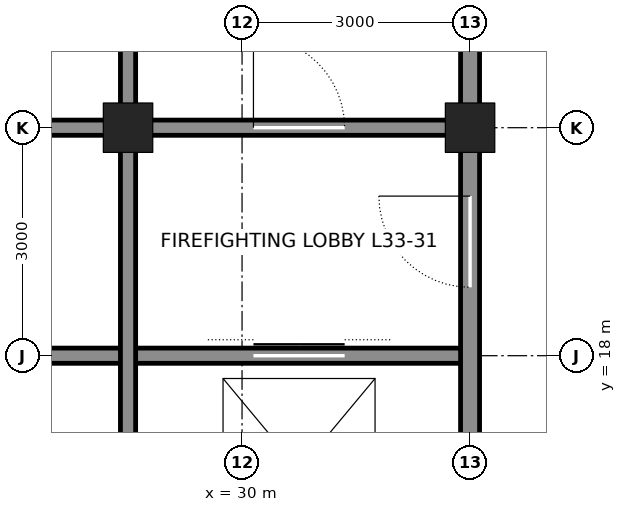
"""IFC4 building model, lengths in metres.
Left out: names, types, materials, properties, quantities, classifications, styles, units other than length and angle.
Written with IfcOpenShell. Run it as: python <this file> out.ifc"""

import sys

from ifc_helpers import new_model, si_unit, direction, frame, frame_2d, origin, origin_2d, place, context, subcontext, project, spatial, rectangle, hollow_rectangle, extrude, element, fill, save


model = new_model("IFC4")
c1 = context("Model", 3, precision=1e-05, world=origin(), true_north=direction((0.0, 1.0)))
c2 = subcontext(c1, "Body", "Model", "MODEL_VIEW")
j1 = project(units=[si_unit("LENGTHUNIT", "METRE"), si_unit("PLANEANGLEUNIT", "RADIAN")], contexts=[c1])
p1 = place(None, origin())
s1 = spatial("IfcSite", under=j1, at=p1, CompositionType="ELEMENT")
p2 = place(p1, origin())
s2 = spatial("IfcBuilding", under=s1, at=p2, CompositionType="ELEMENT")
p3 = place(p2, frame((0.0, 0.0, 153.0)))
s3 = spatial("IfcBuildingStorey", under=s2, at=p3, CompositionType="ELEMENT", Elevation=153.0)
for number, where, z_axis, x_axis in (
    (1, (33.0, 21.0, 0.0), (0.0, 0.0, 1.0), (1.0, 0.0, 0.0)),
    (2, (28.5, 21.0, 0.0), (0.0, 0.0, 1.0), (1.0, 0.0, 0.0)),
):
    element("IfcColumn", number, at=place(p3, frame(where, z_axis=z_axis, x_axis=x_axis)), inside=s3, PredefinedType="COLUMN", context=c2, shape_type="SweptSolid", body=[
        extrude(hollow_rectangle(XDim=0.65, YDim=0.65, WallThickness=0.065, at=origin_2d()), origin(), (0.0, 0.0, 1.0), 4.2),
    ])
p4 = place(p3, frame((25.5, 18.0, 0.0), z_axis=(0.0, 0.0, 1.0), x_axis=(1.0, 0.0, 0.0)))
e3 = element("IfcWall", 3, at=p4, inside=s3, PredefinedType="SOLIDWALL", context=c2, shape_type="SweptSolid", body=[
    extrude(rectangle(XDim=7.5, YDim=0.2, at=frame_2d((3.75, 0.0))), origin(), (0.0, 0.0, 1.0), 4.04),
])
p5 = place(p4, frame((4.65, 0.0, 0.0)))
e4 = element("IfcOpeningElement", 4, at=p5, cuts=e3, PredefinedType="OPENING", context=c2, shape_type="SweptSolid", body=[
    extrude(rectangle(XDim=1.2, YDim=2.1, at=frame_2d((0.6, 1.05))), frame((0.0, 0.11, 0.0), z_axis=(0.0, -1.0, 0.0), x_axis=(1.0, 0.0, 0.0)), (0.0, 0.0, 1.0), 0.22),
])
p6 = place(p3, frame((25.5, 21.0, 0.0), z_axis=(0.0, 0.0, 1.0), x_axis=(1.0, 0.0, 0.0)))
e5 = element("IfcWall", 5, at=p6, inside=s3, PredefinedType="SOLIDWALL", context=c2, shape_type="SweptSolid", body=[
    extrude(rectangle(XDim=2.75, YDim=0.2, at=frame_2d((1.375, 0.0))), origin(), (0.0, 0.0, 1.0), 3.09),
])
p7 = place(p3, frame((28.75, 21.0, 0.0), z_axis=(0.0, 0.0, 1.0), x_axis=(1.0, 0.0, 0.0)))
e6 = element("IfcWall", 6, at=p7, inside=s3, PredefinedType="SOLIDWALL", context=c2, shape_type="SweptSolid", body=[
    extrude(rectangle(XDim=4.0, YDim=0.2, at=frame_2d((2.0, 0.0))), origin(), (0.0, 0.0, 1.0), 3.09),
])
p8 = place(p7, frame((1.4, 0.0, 0.0)))
e7 = element("IfcOpeningElement", 7, at=p8, cuts=e6, PredefinedType="OPENING", context=c2, shape_type="SweptSolid", body=[
    extrude(rectangle(XDim=1.2, YDim=2.1, at=frame_2d((0.6, 1.05))), frame((0.0, 0.11, 0.0), z_axis=(0.0, -1.0, 0.0), x_axis=(1.0, 0.0, 0.0)), (0.0, 0.0, 1.0), 0.22),
])
p9 = place(p3, frame((28.5, 12.25, 0.0), z_axis=(0.0, 0.0, 1.0), x_axis=(0.0, 1.0, 0.0)))
e8 = element("IfcWall", 8, at=p9, inside=s3, PredefinedType="SOLIDWALL", context=c2, shape_type="SweptSolid", body=[
    extrude(rectangle(XDim=8.5, YDim=0.2, at=frame_2d((4.25, 0.0))), origin(), (0.0, 0.0, 1.0), 3.113),
])
p10 = place(p3, frame((28.5, 21.25, 0.0), z_axis=(0.0, 0.0, 1.0), x_axis=(0.0, 1.0, 0.0)))
e9 = element("IfcWall", 9, at=p10, inside=s3, PredefinedType="SOLIDWALL", context=c2, shape_type="SweptSolid", body=[
    extrude(rectangle(XDim=2.5, YDim=0.2, at=frame_2d((1.25, 0.0))), origin(), (0.0, 0.0, 1.0), 3.113),
])
p11 = place(p3, frame((33.0, 12.25, 0.0), z_axis=(0.0, 0.0, 1.0), x_axis=(0.0, 1.0, 0.0)))
e10 = element("IfcWall", 10, at=p11, inside=s3, PredefinedType="SOLIDWALL", context=c2, shape_type="SweptSolid", body=[
    extrude(rectangle(XDim=8.5, YDim=0.25, at=frame_2d((4.25, 0.0))), origin(), (0.0, 0.0, 1.0), 3.113),
])
p12 = place(p11, frame((6.65, 0.0, 0.0)))
e11 = element("IfcOpeningElement", 11, at=p12, cuts=e10, PredefinedType="OPENING", context=c2, shape_type="SweptSolid", body=[
    extrude(rectangle(XDim=1.2, YDim=2.1, at=frame_2d((0.6, 1.05))), frame((0.0, 0.135, 0.0), z_axis=(0.0, -1.0, 0.0), x_axis=(1.0, 0.0, 0.0)), (0.0, 0.0, 1.0), 0.27),
])
p13 = place(p11, frame((0.875, 0.0, 0.0)))
e12 = element("IfcOpeningElement", 12, at=p13, cuts=e10, PredefinedType="OPENING", context=c2, shape_type="SweptSolid", body=[
    extrude(rectangle(XDim=0.75, YDim=2.1, at=frame_2d((0.375, 1.05))), frame((0.0, 0.135, 0.0), z_axis=(0.0, -1.0, 0.0), x_axis=(1.0, 0.0, 0.0)), (0.0, 0.0, 1.0), 0.27),
])
p14 = place(p3, frame((33.0, 21.25, 0.0), z_axis=(0.0, 0.0, 1.0), x_axis=(0.0, 1.0, 0.0)))
e13 = element("IfcWall", 13, at=p14, inside=s3, PredefinedType="SOLIDWALL", context=c2, shape_type="SweptSolid", body=[
    extrude(rectangle(XDim=2.5, YDim=0.25, at=frame_2d((1.25, 0.0))), origin(), (0.0, 0.0, 1.0), 3.113),
])
p15 = place(p8, origin())
e14 = element("IfcDoor", 14, at=p15, inside=s3, OperationType="SINGLE_SWING_LEFT", PredefinedType="DOOR", context=c2, shape_type="SweptSolid", body=[
    extrude(rectangle(XDim=1.2, YDim=2.1, at=frame_2d((0.6, 1.05))), frame((0.0, 0.025, 0.0), z_axis=(0.0, -1.0, 0.0), x_axis=(1.0, 0.0, 0.0)), (0.0, 0.0, 1.0), 0.05),
])
fill(e7, e14)
p16 = place(p12, origin())
e15 = element("IfcDoor", 15, at=p16, inside=s3, OperationType="SINGLE_SWING_RIGHT", PredefinedType="DOOR", context=c2, shape_type="SweptSolid", body=[
    extrude(rectangle(XDim=1.2, YDim=2.1, at=frame_2d((0.6, 1.05))), frame((0.0, 0.025, 0.0), z_axis=(0.0, -1.0, 0.0), x_axis=(1.0, 0.0, 0.0)), (0.0, 0.0, 1.0), 0.05),
])
fill(e11, e15)
p17 = place(p5, origin())
e16 = element("IfcDoor", 16, at=p17, inside=s3, OperationType="DOUBLE_DOOR_SLIDING", PredefinedType="DOOR", context=c2, shape_type="SweptSolid", body=[
    extrude(rectangle(XDim=1.2, YDim=2.1, at=frame_2d((0.6, 1.05))), frame((0.0, 0.025, 0.0), z_axis=(0.0, -1.0, 0.0), x_axis=(1.0, 0.0, 0.0)), (0.0, 0.0, 1.0), 0.05),
])
fill(e4, e16)
save(model, sys.argv[1])
